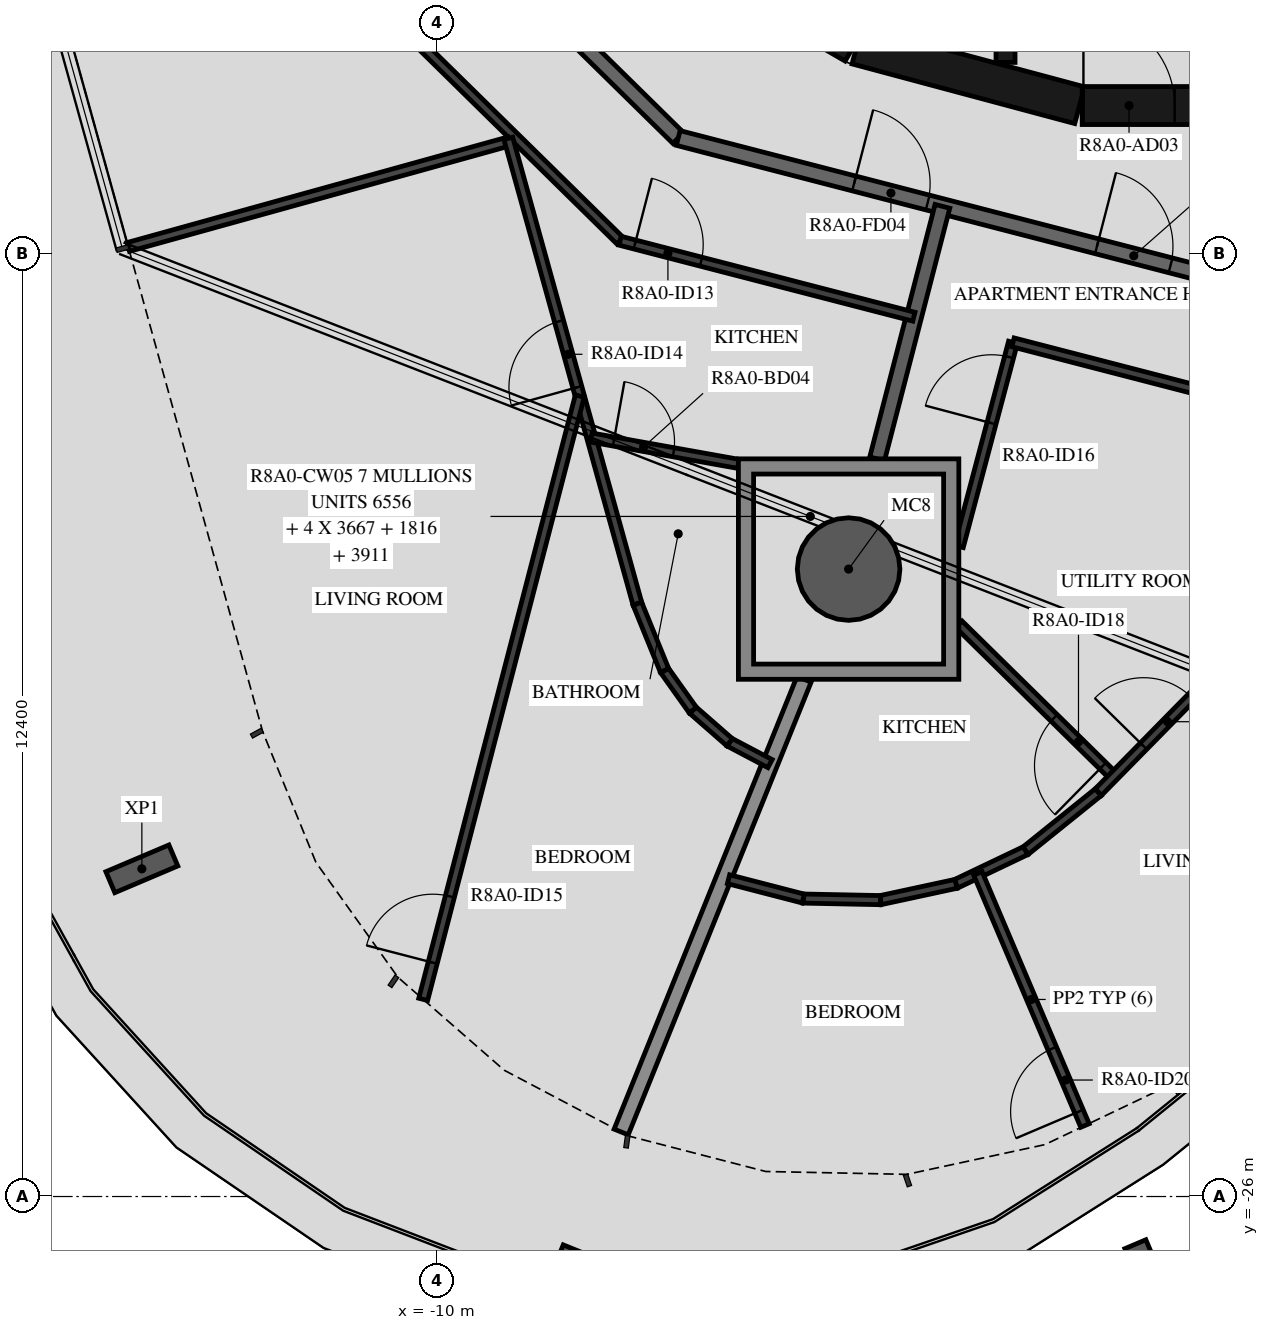
"""IFC4 building model, lengths in metres.
Left out: names, types, materials, properties, quantities, classifications, styles, units other than length and angle.
Written with IfcOpenShell. Run it as: python <this file> out.ifc"""

import sys

from ifc_helpers import new_model, si_unit, direction, frame, frame_2d, origin, origin_2d, place, context, subcontext, project, spatial, polyline, rectangle, hollow_circle, i_section, outline, extrude, element, fill, save


model = new_model("IFC4")
c1 = context("Model", 3, precision=1e-05, world=origin(), true_north=direction((0.0, 1.0)))
c2 = subcontext(c1, "Body", "Model", "MODEL_VIEW")
j1 = project(units=[si_unit("LENGTHUNIT", "METRE"), si_unit("PLANEANGLEUNIT", "RADIAN")], contexts=[c1])
p1 = place(None, origin())
s1 = spatial("IfcSite", under=j1, at=p1, CompositionType="ELEMENT")
p2 = place(p1, origin())
s2 = spatial("IfcBuilding", under=s1, at=p2, CompositionType="ELEMENT")
p3 = place(p2, frame((0.0, 0.0, 298.2)))
s3 = spatial("IfcBuildingStorey", under=s2, at=p3, CompositionType="ELEMENT", Elevation=298.2)
p4 = place(p3, frame((-4.589, -17.745, -0.45), z_axis=(0.0, 0.0, 1.0), x_axis=(1.0, 0.0, 0.0)))
e1 = element("IfcColumn", 1, at=p4, inside=s3, PredefinedType="COLUMN", context=c2, shape_type="SweptSolid", body=[
    extrude(hollow_circle(Radius=0.675, WallThickness=0.03, at=origin_2d()), origin(), (0.0, 0.0, 1.0), 3.57),
])
for number, where, z_axis, x_axis in (
    (2, (-13.887, -21.689, -0.45), (0.0, 0.0, 1.0), (-0.39, 0.921, 0.0)),
    (3, (-8.373, -27.11, -0.45), (0.0, 0.0, 1.0), (-0.927, 0.375, 0.0)),
    (4, (-0.641, -27.042, -0.45), (0.0, 0.0, 1.0), (-0.92, -0.391, 0.0)),
):
    element("IfcColumn", number, at=place(p3, frame(where, z_axis=z_axis, x_axis=x_axis)), inside=s3, PredefinedType="COLUMN", context=c2, shape_type="SweptSolid", body=[
        extrude(i_section(OverallWidth=0.3, OverallDepth=0.9, WebThickness=0.019, FlangeThickness=0.035, FilletRadius=0.03, at=origin_2d()), origin(), (0.0, 0.0, 1.0), 3.57),
    ])
for number, where, z_axis, x_axis in (
    (5, (-7.137, -9.329, 0.0), (0.0, 0.0, 1.0), (0.866, -0.5, 0.0)),
    (6, (-4.479, -10.858, 0.0), (0.0, 0.0, 1.0), (0.966, -0.259, 0.0)),
):
    element("IfcWall", number, at=place(p3, frame(where, z_axis=z_axis, x_axis=x_axis)), inside=s3, PredefinedType="SHEAR", context=c2, shape_type="SweptSolid", body=[
        extrude(rectangle(XDim=3.033, YDim=0.5, at=frame_2d((1.516, 0.0))), origin(), (0.0, 0.0, 1.0), 3.12),
    ])
p5 = place(p3, frame((-1.516, -11.647, 0.0), z_axis=(0.0, 0.0, 1.0), x_axis=(1.0, 0.0, 0.0)))
e7 = element("IfcWall", 7, at=p5, inside=s3, PredefinedType="SHEAR", context=c2, shape_type="SweptSolid", body=[
    extrude(rectangle(XDim=3.033, YDim=0.5, at=frame_2d((1.516, 0.0))), origin(), (0.0, 0.0, 1.0), 3.12),
])
p6 = place(p5, frame((0.016, 0.0, 0.0)))
e8 = element("IfcOpeningElement", 8, at=p6, cuts=e7, PredefinedType="OPENING", context=c2, shape_type="SweptSolid", body=[
    extrude(rectangle(XDim=1.2, YDim=2.1, at=frame_2d((0.6, 1.05))), frame((0.0, 0.26, 0.0), z_axis=(0.0, -1.0, 0.0), x_axis=(1.0, 0.0, 0.0)), (0.0, 0.0, 1.0), 0.52),
])
p7 = place(p3, frame((-2.525, -8.97, 0.0), z_axis=(0.0, 0.0, 1.0), x_axis=(0.0, -1.0, 0.0)))
e9 = element("IfcWall", 9, at=p7, inside=s3, PredefinedType="SHEAR", context=c2, shape_type="SweptSolid", body=[
    extrude(rectangle(XDim=2.11, YDim=0.25, at=frame_2d((1.055, 0.0))), origin(), (0.0, 0.0, 1.0), 3.12),
])
p8 = place(p3, frame((-11.953, -7.041, 0.0), z_axis=(0.0, 0.0, 1.0), x_axis=(0.713250549143, -0.70090916255, 0.0)))
e10 = element("IfcWall", 10, at=p8, inside=s3, PredefinedType="STANDARD", context=c2, shape_type="SweptSolid", body=[
    extrude(rectangle(XDim=7.181, YDim=0.2, at=frame_2d((3.59, 0.0))), origin(), (0.0, 0.0, 1.0), 3.12),
])
p9 = place(p3, frame((-6.831, -12.074, 0.0), z_axis=(0.0, 0.0, 1.0), x_axis=(0.968144780225, -0.250391063186, 0.0)))
e11 = element("IfcWall", 11, at=p9, inside=s3, PredefinedType="STANDARD", context=c2, shape_type="SweptSolid", body=[
    extrude(rectangle(XDim=7.181, YDim=0.2, at=frame_2d((3.591, 0.0))), origin(), (0.0, 0.0, 1.0), 3.12),
])
p10 = place(p9, frame((2.39, 0.0, 0.0)))
e12 = element("IfcOpeningElement", 12, at=p10, cuts=e11, PredefinedType="OPENING", context=c2, shape_type="SweptSolid", body=[
    extrude(rectangle(XDim=1.0, YDim=2.1, at=frame_2d((0.5, 1.05))), frame((0.0, 0.11, 0.0), z_axis=(0.0, -1.0, 0.0), x_axis=(1.0, 0.0, 0.0)), (0.0, 0.0, 1.0), 0.22),
])
p11 = place(p9, frame((5.69, 0.0, 0.0)))
e13 = element("IfcOpeningElement", 13, at=p11, cuts=e11, PredefinedType="OPENING", context=c2, shape_type="SweptSolid", body=[
    extrude(rectangle(XDim=1.0, YDim=2.1, at=frame_2d((0.5, 1.05))), frame((0.0, 0.11, 0.0), z_axis=(0.0, -1.0, 0.0), x_axis=(1.0, 0.0, 0.0)), (0.0, 0.0, 1.0), 0.22),
])
p12 = place(p3, frame((-4.214, -16.295, 0.0), z_axis=(0.0, 0.0, 1.0), x_axis=(0.250428810918, 0.968135016752, 0.0)))
e14 = element("IfcWall", 14, at=p12, inside=s3, PredefinedType="STANDARD", context=c2, shape_type="SweptSolid", body=[
    extrude(rectangle(XDim=3.432, YDim=0.2, at=frame_2d((1.716, 0.0))), origin(), (0.0, 0.0, 1.0), 3.12),
])
p13 = place(p3, frame((-7.582, -25.151, 0.0), z_axis=(0.0, 0.0, 1.0), x_axis=(0.374645287615, 0.927168220156, 0.0)))
e15 = element("IfcWall", 15, at=p13, inside=s3, PredefinedType="STANDARD", context=c2, shape_type="SweptSolid", body=[
    extrude(rectangle(XDim=6.423, YDim=0.2, at=frame_2d((3.212, 0.0))), origin(), (0.0, 0.0, 1.0), 2.73),
])
p14 = place(p3, frame((-10.59, -10.483, 0.0), z_axis=(0.0, 0.0, 1.0), x_axis=(0.713244109461, -0.70091571556, 0.0)))
e16 = element("IfcWall", 16, at=p14, inside=s3, PredefinedType="PARTITIONING", context=c2, shape_type="SweptSolid", body=[
    extrude(rectangle(XDim=4.198, YDim=0.12, at=frame_2d((2.099, 0.0))), origin(), (0.0, 0.0, 1.0), 3.12),
])
p15 = place(p3, frame((-7.596, -13.426, 0.0), z_axis=(0.0, 0.0, 1.0), x_axis=(0.96815406745, -0.250355151095, 0.0)))
e17 = element("IfcWall", 17, at=p15, inside=s3, PredefinedType="PARTITIONING", context=c2, shape_type="SweptSolid", body=[
    extrude(rectangle(XDim=3.992, YDim=0.12, at=frame_2d((1.996, 0.0))), origin(), (0.0, 0.0, 1.0), 3.12),
])
p16 = place(p15, frame((0.2, 0.0, 0.0)))
e18 = element("IfcOpeningElement", 18, at=p16, cuts=e17, PredefinedType="OPENING", context=c2, shape_type="SweptSolid", body=[
    extrude(rectangle(XDim=0.9, YDim=2.1, at=frame_2d((0.45, 1.05))), frame((0.0, 0.07, 0.0), z_axis=(0.0, -1.0, 0.0), x_axis=(1.0, 0.0, 0.0)), (0.0, 0.0, 1.0), 0.14),
])
p17 = place(p3, frame((-14.066, -13.508, 0.0), z_axis=(0.0, 0.0, 1.0), x_axis=(0.963643585504, 0.267191018032, 0.0)))
e19 = element("IfcWall", 19, at=p17, inside=s3, PredefinedType="PARTITIONING", context=c2, shape_type="SweptSolid", body=[
    extrude(rectangle(XDim=5.2, YDim=0.12, at=frame_2d((2.6, 0.0))), origin(), (0.0, 0.0, 1.0), 2.73),
])
p18 = place(p3, frame((-7.368, -18.202, 0.0), z_axis=(0.0, 0.0, 1.0), x_axis=(-0.26723158658, 0.963632336077, 0.0)))
e20 = element("IfcWall", 20, at=p18, inside=s3, PredefinedType="PARTITIONING", context=c2, shape_type="SweptSolid", body=[
    extrude(rectangle(XDim=6.353, YDim=0.12, at=frame_2d((3.177, 0.0))), origin(), (0.0, 0.0, 1.0), 3.12),
])
p19 = place(p18, frame((2.956, 0.0, 0.0)))
e21 = element("IfcOpeningElement", 21, at=p19, cuts=e20, PredefinedType="OPENING", context=c2, shape_type="SweptSolid", body=[
    extrude(rectangle(XDim=0.9, YDim=2.1, at=frame_2d((0.45, 1.05))), frame((0.0, 0.07, 0.0), z_axis=(0.0, -1.0, 0.0), x_axis=(1.0, 0.0, 0.0)), (0.0, 0.0, 1.0), 0.14),
])
p20 = place(p3, frame((-10.186, -23.406, 0.0), z_axis=(0.0, 0.0, 1.0), x_axis=(0.251184292323, 0.967939280787, 0.0)))
e22 = element("IfcWall", 22, at=p20, inside=s3, PredefinedType="PARTITIONING", context=c2, shape_type="SweptSolid", body=[
    extrude(rectangle(XDim=8.2, YDim=0.12, at=frame_2d((4.1, 0.0))), origin(), (0.0, 0.0, 1.0), 3.12),
])
p21 = place(p20, frame((0.5, 0.0, 0.0)))
e23 = element("IfcOpeningElement", 23, at=p21, cuts=e22, PredefinedType="OPENING", context=c2, shape_type="SweptSolid", body=[
    extrude(rectangle(XDim=0.9, YDim=2.1, at=frame_2d((0.45, 1.05))), frame((0.0, 0.07, 0.0), z_axis=(0.0, -1.0, 0.0), x_axis=(1.0, 0.0, 0.0)), (0.0, 0.0, 1.0), 0.14),
])
p22 = place(p3, frame((-7.975, -16.015, 0.0), z_axis=(0.0, 0.0, 1.0), x_axis=(0.984356897167, -0.176185978441, 0.0)))
e24 = element("IfcWall", 24, at=p22, inside=s3, PredefinedType="PARTITIONING", context=c2, shape_type="SweptSolid", body=[
    extrude(rectangle(XDim=1.966, YDim=0.12, at=frame_2d((0.983, 0.0))), origin(), (0.0, 0.0, 1.0), 3.12),
])
p23 = place(p22, frame((0.3, 0.0, 0.0)))
e25 = element("IfcOpeningElement", 25, at=p23, cuts=e24, PredefinedType="OPENING", context=c2, shape_type="SweptSolid", body=[
    extrude(rectangle(XDim=0.8, YDim=2.1, at=frame_2d((0.4, 1.05))), frame((0.0, 0.07, 0.0), z_axis=(0.0, -1.0, 0.0), x_axis=(1.0, 0.0, 0.0)), (0.0, 0.0, 1.0), 0.14),
])
p24 = place(p3, frame((-5.623, -20.305, 0.0), z_axis=(0.0, 0.0, 1.0), x_axis=(-0.884133271246, 0.467234800369, 0.0)))
e26 = element("IfcWall", 26, at=p24, inside=s3, PredefinedType="PARTITIONING", context=c2, shape_type="SweptSolid", body=[
    extrude(rectangle(XDim=0.601, YDim=0.12, at=frame_2d((0.301, 0.0))), origin(), (0.0, 0.0, 1.0), 3.12),
])
p25 = place(p3, frame((-6.155, -20.024, 0.0), z_axis=(0.0, 0.0, 1.0), x_axis=(-0.753047703781, 0.657965923001, 0.0)))
e27 = element("IfcWall", 27, at=p25, inside=s3, PredefinedType="PARTITIONING", context=c2, shape_type="SweptSolid", body=[
    extrude(rectangle(XDim=0.642, YDim=0.12, at=frame_2d((0.321, 0.0))), origin(), (0.0, 0.0, 1.0), 3.12),
])
p26 = place(p3, frame((-6.638, -19.601, 0.0), z_axis=(0.0, 0.0, 1.0), x_axis=(-0.580662514246, 0.814144363458, 0.0)))
e28 = element("IfcWall", 28, at=p26, inside=s3, PredefinedType="PARTITIONING", context=c2, shape_type="SweptSolid", body=[
    extrude(rectangle(XDim=0.642, YDim=0.12, at=frame_2d((0.321, 0.0))), origin(), (0.0, 0.0, 1.0), 3.12),
])
p27 = place(p3, frame((-7.011, -19.079, 0.0), z_axis=(0.0, 0.0, 1.0), x_axis=(-0.377296887314, 0.92609235977, 0.0)))
e29 = element("IfcWall", 29, at=p27, inside=s3, PredefinedType="PARTITIONING", context=c2, shape_type="SweptSolid", body=[
    extrude(rectangle(XDim=0.947, YDim=0.12, at=frame_2d((0.473, 0.0))), origin(), (0.0, 0.0, 1.0), 3.12),
])
p28 = place(p3, frame((-3.139, -17.448, 0.0), z_axis=(0.0, 0.0, 1.0), x_axis=(0.256551998295, 0.966530430028, 0.0)))
e30 = element("IfcWall", 30, at=p28, inside=s3, PredefinedType="PARTITIONING", context=c2, shape_type="SweptSolid", body=[
    extrude(rectangle(XDim=2.778, YDim=0.12, at=frame_2d((1.389, 0.0))), origin(), (0.0, 0.0, 1.0), 3.12),
])
p29 = place(p28, frame((1.678, 0.0, 0.0)))
e31 = element("IfcOpeningElement", 31, at=p29, cuts=e30, PredefinedType="OPENING", context=c2, shape_type="SweptSolid", body=[
    extrude(rectangle(XDim=0.9, YDim=2.1, at=frame_2d((0.45, 1.05))), frame((0.0, 0.07, 0.0), z_axis=(0.0, -1.0, 0.0), x_axis=(1.0, 0.0, 0.0)), (0.0, 0.0, 1.0), 0.14),
])
p30 = place(p3, frame((-2.427, -14.763, 0.0), z_axis=(0.0, 0.0, 1.0), x_axis=(0.968151154118, -0.250366417036, 0.0)))
e32 = element("IfcWall", 32, at=p30, inside=s3, PredefinedType="PARTITIONING", context=c2, shape_type="SweptSolid", body=[
    extrude(rectangle(XDim=2.646, YDim=0.12, at=frame_2d((1.323, 0.0))), origin(), (0.0, 0.0, 1.0), 3.12),
])
p31 = place(p3, frame((-2.26, -21.449, 0.0), z_axis=(0.0, 0.0, 1.0), x_axis=(-0.90254047062, -0.430605038166, 0.0)))
e33 = element("IfcWall", 33, at=p31, inside=s3, PredefinedType="PARTITIONING", context=c2, shape_type="SweptSolid", body=[
    extrude(rectangle(XDim=1.016, YDim=0.12, at=frame_2d((0.508, 0.0))), origin(), (0.0, 0.0, 1.0), 3.12),
])
for number, where, z_axis, x_axis in (
    (34, (-3.177, -21.887, 0.0), (0.0, 0.0, 1.0), (-0.978, -0.211, 0.0)),
    (35, (-4.17, -22.101, 0.0), (0.0, 0.0, 1.0), (-1.0, 0.02, 0.0)),
):
    element("IfcWall", number, at=place(p3, frame(where, z_axis=z_axis, x_axis=x_axis)), inside=s3, PredefinedType="PARTITIONING", context=c2, shape_type="SweptSolid", body=[
        extrude(rectangle(XDim=1.016, YDim=0.12, at=frame_2d((0.508, 0.0))), origin(), (0.0, 0.0, 1.0), 3.12),
    ])
p32 = place(p3, frame((-5.186, -22.08, 0.0), z_axis=(0.0, 0.0, 1.0), x_axis=(-0.968145907309, 0.250386705241, 0.0)))
e36 = element("IfcWall", 36, at=p32, inside=s3, PredefinedType="PARTITIONING", context=c2, shape_type="SweptSolid", body=[
    extrude(rectangle(XDim=1.016, YDim=0.12, at=frame_2d((0.508, 0.0))), origin(), (0.0, 0.0, 1.0), 3.12),
])
p33 = place(p3, frame((-1.48, -25.066, 0.0), z_axis=(0.0, 0.0, 1.0), x_axis=(-0.3909326022, 0.920419306912, 0.0)))
e37 = element("IfcWall", 37, at=p33, inside=s3, PredefinedType="PARTITIONING", context=c2, shape_type="SweptSolid", body=[
    extrude(rectangle(XDim=3.604, YDim=0.12, at=frame_2d((1.802, 0.0))), origin(), (0.0, 0.0, 1.0), 2.73),
])
p34 = place(p33, frame((0.2, 0.0, 0.0)))
e38 = element("IfcOpeningElement", 38, at=p34, cuts=e37, PredefinedType="OPENING", context=c2, shape_type="SweptSolid", body=[
    extrude(rectangle(XDim=0.9, YDim=2.1, at=frame_2d((0.45, 1.05))), frame((0.0, 0.07, 0.0), z_axis=(0.0, -1.0, 0.0), x_axis=(1.0, 0.0, 0.0)), (0.0, 0.0, 1.0), 0.14),
])
p35 = place(p3, frame((-1.101, -20.474, 0.0), z_axis=(0.0, 0.0, 1.0), x_axis=(-0.713316946232, 0.700841589961, 0.0)))
e39 = element("IfcWall", 39, at=p35, inside=s3, PredefinedType="PARTITIONING", context=c2, shape_type="SweptSolid", body=[
    extrude(rectangle(XDim=2.857, YDim=0.12, at=frame_2d((1.429, 0.0))), origin(), (0.0, 0.0, 1.0), 3.12),
])
p36 = place(p35, frame((0.2, 0.0, 0.0)))
e40 = element("IfcOpeningElement", 40, at=p36, cuts=e39, PredefinedType="OPENING", context=c2, shape_type="SweptSolid", body=[
    extrude(rectangle(XDim=0.9, YDim=2.1, at=frame_2d((0.45, 1.05))), frame((0.0, 0.07, 0.0), z_axis=(0.0, -1.0, 0.0), x_axis=(1.0, 0.0, 0.0)), (0.0, 0.0, 1.0), 0.14),
])
p37 = place(p3, frame((-2.26, -21.449, 0.0), z_axis=(0.0, 0.0, 1.0), x_axis=(0.779021167429, 0.626997624156, 0.0)))
e41 = element("IfcWall", 41, at=p37, inside=s3, PredefinedType="PARTITIONING", context=c2, shape_type="SweptSolid", body=[
    extrude(rectangle(XDim=1.227, YDim=0.12, at=frame_2d((0.614, 0.0))), origin(), (0.0, 0.0, 1.0), 3.12),
])
p38 = place(p3, frame((-1.304, -20.68, 0.0), z_axis=(0.0, 0.0, 1.0), x_axis=(0.700896976526, 0.713262524108, 0.0)))
e42 = element("IfcWall", 42, at=p38, inside=s3, PredefinedType="PARTITIONING", context=c2, shape_type="SweptSolid", body=[
    extrude(rectangle(XDim=9.358, YDim=0.12, at=frame_2d((4.679, 0.0))), origin(), (0.0, 0.0, 1.0), 3.12),
])
p39 = place(p38, frame((0.849, 0.0, 0.0)))
e43 = element("IfcOpeningElement", 43, at=p39, cuts=e42, PredefinedType="OPENING", context=c2, shape_type="SweptSolid", body=[
    extrude(rectangle(XDim=0.9, YDim=2.1, at=frame_2d((0.45, 1.05))), frame((0.0, 0.07, 0.0), z_axis=(0.0, -1.0, 0.0), x_axis=(1.0, 0.0, 0.0)), (0.0, 0.0, 1.0), 0.14),
])
p40 = place(p3, origin())
e44 = element("IfcWall", 44, at=p40, inside=s3, PredefinedType="STANDARD", context=c2, shape_type="SweptSolid", body=[
    extrude(outline(polyline([(-3.139, -16.295), (-3.139, -19.195), (-6.039, -19.195), (-6.039, -16.295), (-3.139, -16.295)]), holes=[polyline([(-5.839, -18.995), (-3.339, -18.995), (-3.339, -16.495), (-5.839, -16.495), (-5.839, -18.995)])]), origin(), (0.0, 0.0, 1.0), 3.12),
])
p41 = place(p6, origin())
e45 = element("IfcDoor", 45, at=p41, inside=s3, OperationType="SINGLE_SWING_RIGHT", PredefinedType="DOOR", context=c2, shape_type="SweptSolid", body=[
    extrude(rectangle(XDim=1.2, YDim=2.1, at=frame_2d((0.6, 1.05))), frame((0.0, 0.025, 0.0), z_axis=(0.0, -1.0, 0.0), x_axis=(1.0, 0.0, 0.0)), (0.0, 0.0, 1.0), 0.05),
])
fill(e8, e45)
p42 = place(p10, origin())
e46 = element("IfcDoor", 46, at=p42, inside=s3, OperationType="SINGLE_SWING_RIGHT", PredefinedType="DOOR", context=c2, shape_type="SweptSolid", body=[
    extrude(rectangle(XDim=1.0, YDim=2.1, at=frame_2d((0.5, 1.05))), frame((0.0, 0.025, 0.0), z_axis=(0.0, -1.0, 0.0), x_axis=(1.0, 0.0, 0.0)), (0.0, 0.0, 1.0), 0.05),
])
fill(e12, e46)
p43 = place(p16, origin())
e47 = element("IfcDoor", 47, at=p43, inside=s3, OperationType="SINGLE_SWING_RIGHT", PredefinedType="DOOR", context=c2, shape_type="SweptSolid", body=[
    extrude(rectangle(XDim=0.9, YDim=2.1, at=frame_2d((0.45, 1.05))), frame((0.0, 0.025, 0.0), z_axis=(0.0, -1.0, 0.0), x_axis=(1.0, 0.0, 0.0)), (0.0, 0.0, 1.0), 0.05),
])
fill(e18, e47)
p44 = place(p19, origin())
e48 = element("IfcDoor", 48, at=p44, inside=s3, OperationType="SINGLE_SWING_RIGHT", PredefinedType="DOOR", context=c2, shape_type="SweptSolid", body=[
    extrude(rectangle(XDim=0.9, YDim=2.1, at=frame_2d((0.45, 1.05))), frame((0.0, 0.025, 0.0), z_axis=(0.0, -1.0, 0.0), x_axis=(1.0, 0.0, 0.0)), (0.0, 0.0, 1.0), 0.05),
])
fill(e21, e48)
p45 = place(p21, origin())
e49 = element("IfcDoor", 49, at=p45, inside=s3, OperationType="SINGLE_SWING_RIGHT", PredefinedType="DOOR", context=c2, shape_type="SweptSolid", body=[
    extrude(rectangle(XDim=0.9, YDim=2.1, at=frame_2d((0.45, 1.05))), frame((0.0, 0.025, 0.0), z_axis=(0.0, -1.0, 0.0), x_axis=(1.0, 0.0, 0.0)), (0.0, 0.0, 1.0), 0.05),
])
fill(e23, e49)
p46 = place(p23, origin())
e50 = element("IfcDoor", 50, at=p46, inside=s3, OperationType="SINGLE_SWING_RIGHT", PredefinedType="DOOR", context=c2, shape_type="SweptSolid", body=[
    extrude(rectangle(XDim=0.8, YDim=2.1, at=frame_2d((0.4, 1.05))), frame((0.0, 0.025, 0.0), z_axis=(0.0, -1.0, 0.0), x_axis=(1.0, 0.0, 0.0)), (0.0, 0.0, 1.0), 0.05),
])
fill(e25, e50)
p47 = place(p11, origin())
e51 = element("IfcDoor", 51, at=p47, inside=s3, OperationType="SINGLE_SWING_LEFT", PredefinedType="DOOR", context=c2, shape_type="SweptSolid", body=[
    extrude(rectangle(XDim=1.0, YDim=2.1, at=frame_2d((0.5, 1.05))), frame((0.0, 0.025, 0.0), z_axis=(0.0, -1.0, 0.0), x_axis=(1.0, 0.0, 0.0)), (0.0, 0.0, 1.0), 0.05),
])
fill(e13, e51)
p48 = place(p29, origin())
e52 = element("IfcDoor", 52, at=p48, inside=s3, OperationType="SINGLE_SWING_LEFT", PredefinedType="DOOR", context=c2, shape_type="SweptSolid", body=[
    extrude(rectangle(XDim=0.9, YDim=2.1, at=frame_2d((0.45, 1.05))), frame((0.0, 0.025, 0.0), z_axis=(0.0, -1.0, 0.0), x_axis=(1.0, 0.0, 0.0)), (0.0, 0.0, 1.0), 0.05),
])
fill(e31, e52)
p49 = place(p36, origin())
e53 = element("IfcDoor", 53, at=p49, inside=s3, OperationType="SINGLE_SWING_LEFT", PredefinedType="DOOR", context=c2, shape_type="SweptSolid", body=[
    extrude(rectangle(XDim=0.9, YDim=2.1, at=frame_2d((0.45, 1.05))), frame((0.0, 0.025, 0.0), z_axis=(0.0, -1.0, 0.0), x_axis=(1.0, 0.0, 0.0)), (0.0, 0.0, 1.0), 0.05),
])
fill(e40, e53)
p50 = place(p39, origin())
e54 = element("IfcDoor", 54, at=p50, inside=s3, OperationType="SINGLE_SWING_LEFT", PredefinedType="DOOR", context=c2, shape_type="SweptSolid", body=[
    extrude(rectangle(XDim=0.9, YDim=2.1, at=frame_2d((0.45, 1.05))), frame((0.0, 0.025, 0.0), z_axis=(0.0, -1.0, 0.0), x_axis=(1.0, 0.0, 0.0)), (0.0, 0.0, 1.0), 0.05),
])
fill(e43, e54)
p51 = place(p34, origin())
e55 = element("IfcDoor", 55, at=p51, inside=s3, OperationType="SINGLE_SWING_LEFT", PredefinedType="DOOR", context=c2, shape_type="SweptSolid", body=[
    extrude(rectangle(XDim=0.9, YDim=2.1, at=frame_2d((0.45, 1.05))), frame((0.0, 0.025, 0.0), z_axis=(0.0, -1.0, 0.0), x_axis=(1.0, 0.0, 0.0)), (0.0, 0.0, 1.0), 0.05),
])
fill(e38, e55)
save(model, sys.argv[1])
